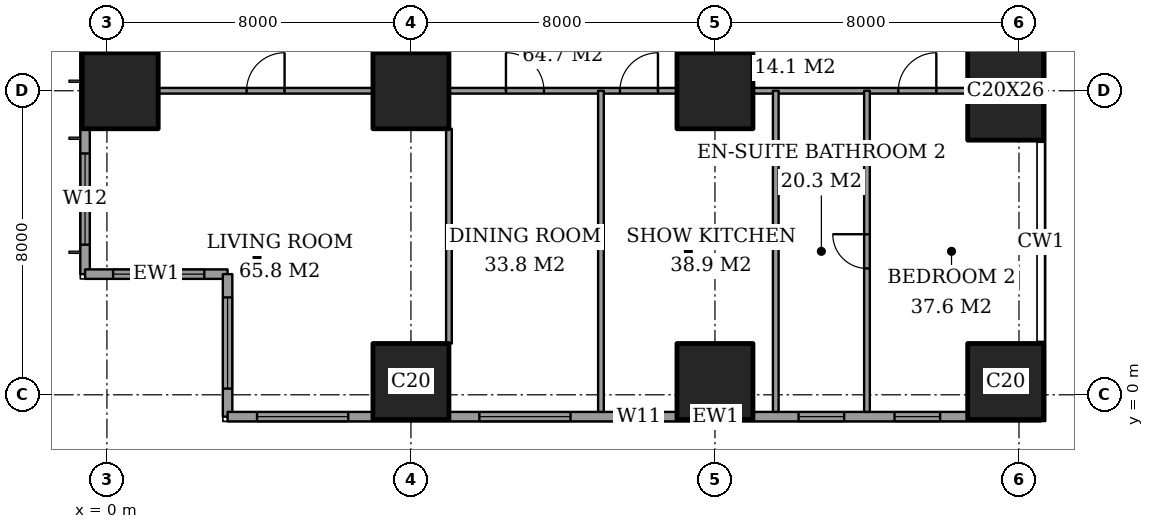
"""IFC4 building model, lengths in metres.
Left out: names, types, materials, properties, quantities, classifications, styles, units other than length and angle.
Written with IfcOpenShell. Run it as: python <this file> out.ifc"""

import sys

from ifc_helpers import new_model, si_unit, direction, frame, frame_2d, origin, origin_2d, place, context, subcontext, project, spatial, rectangle, extrude, element, fill, save


model = new_model("IFC4")
c1 = context("Model", 3, precision=1e-05, world=origin(), true_north=direction((0.0, 1.0)))
c2 = subcontext(c1, "Body", "Model", "MODEL_VIEW")
j1 = project(units=[si_unit("LENGTHUNIT", "METRE"), si_unit("PLANEANGLEUNIT", "RADIAN")], contexts=[c1])
p1 = place(None, origin())
s1 = spatial("IfcSite", under=j1, at=p1, CompositionType="ELEMENT")
p2 = place(p1, origin())
s2 = spatial("IfcBuilding", under=s1, at=p2, CompositionType="ELEMENT")
p3 = place(p2, frame((0.0, 0.0, 139.4)))
s3 = spatial("IfcBuildingStorey", under=s2, at=p3, CompositionType="ELEMENT", Elevation=139.4)
for number, where, z_axis, x_axis in (
    (1, (0.35, 8.0, 0.0), (0.0, 0.0, 1.0), (1.0, 0.0, 0.0)),
    (2, (8.0, 0.35, 0.0), (0.0, 0.0, 1.0), (1.0, 0.0, 0.0)),
    (3, (8.0, 8.0, 0.0), (0.0, 0.0, 1.0), (1.0, 0.0, 0.0)),
    (4, (16.0, 0.35, 0.0), (0.0, 0.0, 1.0), (1.0, 0.0, 0.0)),
    (5, (16.0, 8.0, 0.0), (0.0, 0.0, 1.0), (1.0, 0.0, 0.0)),
    (6, (23.65, 0.35, 0.0), (0.0, 0.0, 1.0), (1.0, 0.0, 0.0)),
):
    element("IfcColumn", number, at=place(p3, frame(where, z_axis=z_axis, x_axis=x_axis)), inside=s3, PredefinedType="COLUMN", context=c2, shape_type="SweptSolid", body=[
        extrude(rectangle(XDim=2.0, YDim=2.0, at=origin_2d()), origin(), (0.0, 0.0, 1.0), 3.6),
    ])
p4 = place(p3, frame((23.65, 8.0, 0.0), z_axis=(0.0, 0.0, 1.0), x_axis=(1.0, 0.0, 0.0)))
e7 = element("IfcColumn", 7, at=p4, inside=s3, PredefinedType="COLUMN", context=c2, shape_type="SweptSolid", body=[
    extrude(rectangle(XDim=2.0, YDim=2.6, at=origin_2d()), origin(), (0.0, 0.0, 1.0), 3.6),
])
p5 = place(p3, frame((-0.575, 44.825, 0.0), z_axis=(0.0, 0.0, 1.0), x_axis=(0.0, -1.0, 0.0)))
e8 = element("IfcWall", 8, at=p5, inside=s3, PredefinedType="SOLIDWALL", context=c2, shape_type="SweptSolid", body=[
    extrude(rectangle(XDim=41.65, YDim=0.25, at=frame_2d((20.825, 0.0))), origin(), (0.0, 0.0, 1.0), 3.6),
])
p6 = place(p5, frame((0.775, 0.0, 0.4)))
e9 = element("IfcOpeningElement", 9, at=p6, cuts=e8, PredefinedType="OPENING", context=c2, shape_type="SweptSolid", body=[
    extrude(rectangle(XDim=2.4, YDim=2.2, at=frame_2d((1.2, 1.1))), frame((0.0, 0.135, 0.0), z_axis=(0.0, -1.0, 0.0), x_axis=(1.0, 0.0, 0.0)), (0.0, 0.0, 1.0), 0.27),
])
p7 = place(p5, frame((6.1, 0.0, 0.4)))
e10 = element("IfcOpeningElement", 10, at=p7, cuts=e8, PredefinedType="OPENING", context=c2, shape_type="SweptSolid", body=[
    extrude(rectangle(XDim=1.2, YDim=2.2, at=frame_2d((0.6, 1.1))), frame((0.0, 0.135, 0.0), z_axis=(0.0, -1.0, 0.0), x_axis=(1.0, 0.0, 0.0)), (0.0, 0.0, 1.0), 0.27),
])
p8 = place(p5, frame((8.425, 0.0, 0.4)))
e11 = element("IfcOpeningElement", 11, at=p8, cuts=e8, PredefinedType="OPENING", context=c2, shape_type="SweptSolid", body=[
    extrude(rectangle(XDim=2.4, YDim=2.2, at=frame_2d((1.2, 1.1))), frame((0.0, 0.135, 0.0), z_axis=(0.0, -1.0, 0.0), x_axis=(1.0, 0.0, 0.0)), (0.0, 0.0, 1.0), 0.27),
])
p9 = place(p5, frame((15.625, 0.0, 0.4)))
e12 = element("IfcOpeningElement", 12, at=p9, cuts=e8, PredefinedType="OPENING", context=c2, shape_type="SweptSolid", body=[
    extrude(rectangle(XDim=2.4, YDim=2.2, at=frame_2d((1.2, 1.1))), frame((0.0, 0.135, 0.0), z_axis=(0.0, -1.0, 0.0), x_axis=(1.0, 0.0, 0.0)), (0.0, 0.0, 1.0), 0.27),
])
p10 = place(p5, frame((23.625, 0.0, 0.4)))
e13 = element("IfcOpeningElement", 13, at=p10, cuts=e8, PredefinedType="OPENING", context=c2, shape_type="SweptSolid", body=[
    extrude(rectangle(XDim=2.4, YDim=2.2, at=frame_2d((1.2, 1.1))), frame((0.0, 0.135, 0.0), z_axis=(0.0, -1.0, 0.0), x_axis=(1.0, 0.0, 0.0)), (0.0, 0.0, 1.0), 0.27),
])
p11 = place(p5, frame((30.825, 0.0, 0.4)))
e14 = element("IfcOpeningElement", 14, at=p11, cuts=e8, PredefinedType="OPENING", context=c2, shape_type="SweptSolid", body=[
    extrude(rectangle(XDim=2.4, YDim=2.2, at=frame_2d((1.2, 1.1))), frame((0.0, 0.135, 0.0), z_axis=(0.0, -1.0, 0.0), x_axis=(1.0, 0.0, 0.0)), (0.0, 0.0, 1.0), 0.27),
])
p12 = place(p5, frame((34.5, 0.0, 0.4)))
e15 = element("IfcOpeningElement", 15, at=p12, cuts=e8, PredefinedType="OPENING", context=c2, shape_type="SweptSolid", body=[
    extrude(rectangle(XDim=1.2, YDim=2.2, at=frame_2d((0.6, 1.1))), frame((0.0, 0.135, 0.0), z_axis=(0.0, -1.0, 0.0), x_axis=(1.0, 0.0, 0.0)), (0.0, 0.0, 1.0), 0.27),
])
p13 = place(p5, frame((38.475, 0.0, 0.4)))
e16 = element("IfcOpeningElement", 16, at=p13, cuts=e8, PredefinedType="OPENING", context=c2, shape_type="SweptSolid", body=[
    extrude(rectangle(XDim=2.4, YDim=2.2, at=frame_2d((1.2, 1.1))), frame((0.0, 0.135, 0.0), z_axis=(0.0, -1.0, 0.0), x_axis=(1.0, 0.0, 0.0)), (0.0, 0.0, 1.0), 0.27),
])
p14 = place(p3, frame((-0.575, 3.175, 0.0), z_axis=(0.0, 0.0, 1.0), x_axis=(1.0, 0.0, 0.0)))
e17 = element("IfcWall", 17, at=p14, inside=s3, PredefinedType="SOLIDWALL", context=c2, shape_type="SweptSolid", body=[
    extrude(rectangle(XDim=3.75, YDim=0.25, at=frame_2d((1.875, 0.0))), origin(), (0.0, 0.0, 1.0), 3.6),
])
p15 = place(p14, frame((0.738, 0.0, 0.4)))
e18 = element("IfcOpeningElement", 18, at=p15, cuts=e17, PredefinedType="OPENING", context=c2, shape_type="SweptSolid", body=[
    extrude(rectangle(XDim=2.4, YDim=2.2, at=frame_2d((1.2, 1.1))), frame((0.0, 0.135, 0.0), z_axis=(0.0, -1.0, 0.0), x_axis=(1.0, 0.0, 0.0)), (0.0, 0.0, 1.0), 0.27),
])
p16 = place(p3, frame((3.175, 3.175, 0.0), z_axis=(0.0, 0.0, 1.0), x_axis=(0.0, -1.0, 0.0)))
e19 = element("IfcWall", 19, at=p16, inside=s3, PredefinedType="SOLIDWALL", context=c2, shape_type="SweptSolid", body=[
    extrude(rectangle(XDim=3.75, YDim=0.25, at=frame_2d((1.875, 0.0))), origin(), (0.0, 0.0, 1.0), 3.6),
])
p17 = place(p16, frame((0.613, 0.0, 0.4)))
e20 = element("IfcOpeningElement", 20, at=p17, cuts=e19, PredefinedType="OPENING", context=c2, shape_type="SweptSolid", body=[
    extrude(rectangle(XDim=2.4, YDim=2.2, at=frame_2d((1.2, 1.1))), frame((0.0, 0.135, 0.0), z_axis=(0.0, -1.0, 0.0), x_axis=(1.0, 0.0, 0.0)), (0.0, 0.0, 1.0), 0.27),
])
p18 = place(p3, frame((3.175, -0.575, 0.0), z_axis=(0.0, 0.0, 1.0), x_axis=(1.0, 0.0, 0.0)))
e21 = element("IfcWall", 21, at=p18, inside=s3, PredefinedType="SOLIDWALL", context=c2, shape_type="SweptSolid", body=[
    extrude(rectangle(XDim=21.4, YDim=0.25, at=frame_2d((10.7, 0.0))), origin(), (0.0, 0.0, 1.0), 3.6),
])
p19 = place(p18, frame((0.775, 0.0, 0.4)))
e22 = element("IfcOpeningElement", 22, at=p19, cuts=e21, PredefinedType="OPENING", context=c2, shape_type="SweptSolid", body=[
    extrude(rectangle(XDim=2.4, YDim=2.2, at=frame_2d((1.2, 1.1))), frame((0.0, 0.135, 0.0), z_axis=(0.0, -1.0, 0.0), x_axis=(1.0, 0.0, 0.0)), (0.0, 0.0, 1.0), 0.27),
])
p20 = place(p18, frame((6.625, 0.0, 0.4)))
e23 = element("IfcOpeningElement", 23, at=p20, cuts=e21, PredefinedType="OPENING", context=c2, shape_type="SweptSolid", body=[
    extrude(rectangle(XDim=2.4, YDim=2.2, at=frame_2d((1.2, 1.1))), frame((0.0, 0.135, 0.0), z_axis=(0.0, -1.0, 0.0), x_axis=(1.0, 0.0, 0.0)), (0.0, 0.0, 1.0), 0.27),
])
p21 = place(p18, frame((10.225, 0.0, 0.4)))
e24 = element("IfcOpeningElement", 24, at=p21, cuts=e21, PredefinedType="OPENING", context=c2, shape_type="SweptSolid", body=[
    extrude(rectangle(XDim=1.2, YDim=2.2, at=frame_2d((0.6, 1.1))), frame((0.0, 0.135, 0.0), z_axis=(0.0, -1.0, 0.0), x_axis=(1.0, 0.0, 0.0)), (0.0, 0.0, 1.0), 0.27),
])
p22 = place(p18, frame((15.025, 0.0, 0.4)))
e25 = element("IfcOpeningElement", 25, at=p22, cuts=e21, PredefinedType="OPENING", context=c2, shape_type="SweptSolid", body=[
    extrude(rectangle(XDim=1.2, YDim=2.2, at=frame_2d((0.6, 1.1))), frame((0.0, 0.135, 0.0), z_axis=(0.0, -1.0, 0.0), x_axis=(1.0, 0.0, 0.0)), (0.0, 0.0, 1.0), 0.27),
])
p23 = place(p18, frame((17.55, 0.0, 0.4)))
e26 = element("IfcOpeningElement", 26, at=p23, cuts=e21, PredefinedType="OPENING", context=c2, shape_type="SweptSolid", body=[
    extrude(rectangle(XDim=1.2, YDim=2.2, at=frame_2d((0.6, 1.1))), frame((0.0, 0.135, 0.0), z_axis=(0.0, -1.0, 0.0), x_axis=(1.0, 0.0, 0.0)), (0.0, 0.0, 1.0), 0.27),
])
p24 = place(p3, frame((1.35, 8.0, 0.0), z_axis=(0.0, 0.0, 1.0), x_axis=(1.0, 0.0, 0.0)))
e27 = element("IfcWall", 27, at=p24, inside=s3, PredefinedType="PARTITIONING", context=c2, shape_type="SweptSolid", body=[
    extrude(rectangle(XDim=5.65, YDim=0.15, at=frame_2d((2.825, 0.0))), origin(), (0.0, 0.0, 1.0), 3.35),
])
p25 = place(p24, frame((2.325, 0.0, 0.0)))
e28 = element("IfcOpeningElement", 28, at=p25, cuts=e27, PredefinedType="OPENING", context=c2, shape_type="SweptSolid", body=[
    extrude(rectangle(XDim=1.0, YDim=2.1, at=frame_2d((0.5, 1.05))), frame((0.0, 0.085, 0.0), z_axis=(0.0, -1.0, 0.0), x_axis=(1.0, 0.0, 0.0)), (0.0, 0.0, 1.0), 0.17),
])
p26 = place(p3, frame((9.0, 8.0, 0.0), z_axis=(0.0, 0.0, 1.0), x_axis=(1.0, 0.0, 0.0)))
e29 = element("IfcWall", 29, at=p26, inside=s3, PredefinedType="PARTITIONING", context=c2, shape_type="SweptSolid", body=[
    extrude(rectangle(XDim=6.0, YDim=0.15, at=frame_2d((3.0, 0.0))), origin(), (0.0, 0.0, 1.0), 3.35),
])
p27 = place(p26, frame((1.5, 0.0, 0.0)))
e30 = element("IfcOpeningElement", 30, at=p27, cuts=e29, PredefinedType="OPENING", context=c2, shape_type="SweptSolid", body=[
    extrude(rectangle(XDim=1.0, YDim=2.1, at=frame_2d((0.5, 1.05))), frame((0.0, 0.085, 0.0), z_axis=(0.0, -1.0, 0.0), x_axis=(1.0, 0.0, 0.0)), (0.0, 0.0, 1.0), 0.17),
])
p28 = place(p26, frame((4.5, 0.0, 0.0)))
e31 = element("IfcOpeningElement", 31, at=p28, cuts=e29, PredefinedType="OPENING", context=c2, shape_type="SweptSolid", body=[
    extrude(rectangle(XDim=1.0, YDim=2.1, at=frame_2d((0.5, 1.05))), frame((0.0, 0.085, 0.0), z_axis=(0.0, -1.0, 0.0), x_axis=(1.0, 0.0, 0.0)), (0.0, 0.0, 1.0), 0.17),
])
p29 = place(p3, frame((17.0, 8.0, 0.0), z_axis=(0.0, 0.0, 1.0), x_axis=(1.0, 0.0, 0.0)))
e32 = element("IfcWall", 32, at=p29, inside=s3, PredefinedType="PARTITIONING", context=c2, shape_type="SweptSolid", body=[
    extrude(rectangle(XDim=5.65, YDim=0.15, at=frame_2d((2.825, 0.0))), origin(), (0.0, 0.0, 1.0), 3.35),
])
p30 = place(p29, frame((3.825, 0.0, 0.0)))
e33 = element("IfcOpeningElement", 33, at=p30, cuts=e32, PredefinedType="OPENING", context=c2, shape_type="SweptSolid", body=[
    extrude(rectangle(XDim=1.0, YDim=2.1, at=frame_2d((0.5, 1.05))), frame((0.0, 0.085, 0.0), z_axis=(0.0, -1.0, 0.0), x_axis=(1.0, 0.0, 0.0)), (0.0, 0.0, 1.0), 0.17),
])
p31 = place(p3, frame((9.0, 1.35, 0.0), z_axis=(0.0, 0.0, 1.0), x_axis=(0.0, 1.0, 0.0)))
e34 = element("IfcWall", 34, at=p31, inside=s3, PredefinedType="PARTITIONING", context=c2, shape_type="SweptSolid", body=[
    extrude(rectangle(XDim=5.65, YDim=0.15, at=frame_2d((2.825, 0.0))), origin(), (0.0, 0.0, 1.0), 3.35),
])
for number, where, z_axis, x_axis in (
    (35, (13.0, -0.45, 0.0), (0.0, 0.0, 1.0), (0.0, 1.0, 0.0)),
    (36, (17.6, -0.45, 0.0), (0.0, 0.0, 1.0), (0.0, 1.0, 0.0)),
):
    element("IfcWall", number, at=place(p3, frame(where, z_axis=z_axis, x_axis=x_axis)), inside=s3, PredefinedType="PARTITIONING", context=c2, shape_type="SweptSolid", body=[
        extrude(rectangle(XDim=8.45, YDim=0.15, at=frame_2d((4.225, 0.0))), origin(), (0.0, 0.0, 1.0), 3.35),
    ])
p32 = place(p3, frame((20.0, -0.45, 0.0), z_axis=(0.0, 0.0, 1.0), x_axis=(0.0, 1.0, 0.0)))
e37 = element("IfcWall", 37, at=p32, inside=s3, PredefinedType="PARTITIONING", context=c2, shape_type="SweptSolid", body=[
    extrude(rectangle(XDim=8.45, YDim=0.15, at=frame_2d((4.225, 0.0))), origin(), (0.0, 0.0, 1.0), 3.35),
])
p33 = place(p32, frame((3.775, 0.0, 0.0)))
e38 = element("IfcOpeningElement", 38, at=p33, cuts=e37, PredefinedType="OPENING", context=c2, shape_type="SweptSolid", body=[
    extrude(rectangle(XDim=0.9, YDim=2.1, at=frame_2d((0.45, 1.05))), frame((0.0, 0.085, 0.0), z_axis=(0.0, -1.0, 0.0), x_axis=(1.0, 0.0, 0.0)), (0.0, 0.0, 1.0), 0.17),
])
p34 = place(p13, origin())
e39 = element("IfcWindow", 39, at=p34, inside=s3, PartitioningType="SINGLE_PANEL", PredefinedType="WINDOW", context=c2, shape_type="SweptSolid", body=[
    extrude(rectangle(XDim=2.4, YDim=2.2, at=frame_2d((1.2, 1.1))), frame((0.0, 0.03, 0.0), z_axis=(0.0, -1.0, 0.0), x_axis=(1.0, 0.0, 0.0)), (0.0, 0.0, 1.0), 0.06),
])
fill(e16, e39)
p35 = place(p15, origin())
e40 = element("IfcWindow", 40, at=p35, inside=s3, PartitioningType="SINGLE_PANEL", PredefinedType="WINDOW", context=c2, shape_type="SweptSolid", body=[
    extrude(rectangle(XDim=2.4, YDim=2.2, at=frame_2d((1.2, 1.1))), frame((0.0, 0.03, 0.0), z_axis=(0.0, -1.0, 0.0), x_axis=(1.0, 0.0, 0.0)), (0.0, 0.0, 1.0), 0.06),
])
fill(e18, e40)
p36 = place(p17, origin())
e41 = element("IfcWindow", 41, at=p36, inside=s3, PartitioningType="SINGLE_PANEL", PredefinedType="WINDOW", context=c2, shape_type="SweptSolid", body=[
    extrude(rectangle(XDim=2.4, YDim=2.2, at=frame_2d((1.2, 1.1))), frame((0.0, 0.03, 0.0), z_axis=(0.0, -1.0, 0.0), x_axis=(1.0, 0.0, 0.0)), (0.0, 0.0, 1.0), 0.06),
])
fill(e20, e41)
p37 = place(p19, origin())
e42 = element("IfcWindow", 42, at=p37, inside=s3, PartitioningType="SINGLE_PANEL", PredefinedType="WINDOW", context=c2, shape_type="SweptSolid", body=[
    extrude(rectangle(XDim=2.4, YDim=2.2, at=frame_2d((1.2, 1.1))), frame((0.0, 0.03, 0.0), z_axis=(0.0, -1.0, 0.0), x_axis=(1.0, 0.0, 0.0)), (0.0, 0.0, 1.0), 0.06),
])
fill(e22, e42)
p38 = place(p20, origin())
e43 = element("IfcWindow", 43, at=p38, inside=s3, PartitioningType="SINGLE_PANEL", PredefinedType="WINDOW", context=c2, shape_type="SweptSolid", body=[
    extrude(rectangle(XDim=2.4, YDim=2.2, at=frame_2d((1.2, 1.1))), frame((0.0, 0.03, 0.0), z_axis=(0.0, -1.0, 0.0), x_axis=(1.0, 0.0, 0.0)), (0.0, 0.0, 1.0), 0.06),
])
fill(e23, e43)
p39 = place(p21, origin())
e44 = element("IfcWindow", 44, at=p39, inside=s3, PartitioningType="SINGLE_PANEL", PredefinedType="WINDOW", context=c2, shape_type="SweptSolid", body=[
    extrude(rectangle(XDim=1.2, YDim=2.2, at=frame_2d((0.6, 1.1))), frame((0.0, 0.03, 0.0), z_axis=(0.0, -1.0, 0.0), x_axis=(1.0, 0.0, 0.0)), (0.0, 0.0, 1.0), 0.06),
])
fill(e24, e44)
p40 = place(p22, origin())
e45 = element("IfcWindow", 45, at=p40, inside=s3, PartitioningType="SINGLE_PANEL", PredefinedType="WINDOW", context=c2, shape_type="SweptSolid", body=[
    extrude(rectangle(XDim=1.2, YDim=2.2, at=frame_2d((0.6, 1.1))), frame((0.0, 0.03, 0.0), z_axis=(0.0, -1.0, 0.0), x_axis=(1.0, 0.0, 0.0)), (0.0, 0.0, 1.0), 0.06),
])
fill(e25, e45)
p41 = place(p23, origin())
e46 = element("IfcWindow", 46, at=p41, inside=s3, PartitioningType="SINGLE_PANEL", PredefinedType="WINDOW", context=c2, shape_type="SweptSolid", body=[
    extrude(rectangle(XDim=1.2, YDim=2.2, at=frame_2d((0.6, 1.1))), frame((0.0, 0.03, 0.0), z_axis=(0.0, -1.0, 0.0), x_axis=(1.0, 0.0, 0.0)), (0.0, 0.0, 1.0), 0.06),
])
fill(e26, e46)
p42 = place(p25, origin())
e47 = element("IfcDoor", 47, at=p42, inside=s3, OperationType="SINGLE_SWING_LEFT", PredefinedType="DOOR", context=c2, shape_type="SweptSolid", body=[
    extrude(rectangle(XDim=1.0, YDim=2.1, at=frame_2d((0.5, 1.05))), frame((0.0, 0.025, 0.0), z_axis=(0.0, -1.0, 0.0), x_axis=(1.0, 0.0, 0.0)), (0.0, 0.0, 1.0), 0.05),
])
fill(e28, e47)
p43 = place(p27, origin())
e48 = element("IfcDoor", 48, at=p43, inside=s3, OperationType="SINGLE_SWING_RIGHT", PredefinedType="DOOR", context=c2, shape_type="SweptSolid", body=[
    extrude(rectangle(XDim=1.0, YDim=2.1, at=frame_2d((0.5, 1.05))), frame((0.0, 0.025, 0.0), z_axis=(0.0, -1.0, 0.0), x_axis=(1.0, 0.0, 0.0)), (0.0, 0.0, 1.0), 0.05),
])
fill(e30, e48)
p44 = place(p28, origin())
e49 = element("IfcDoor", 49, at=p44, inside=s3, OperationType="SINGLE_SWING_LEFT", PredefinedType="DOOR", context=c2, shape_type="SweptSolid", body=[
    extrude(rectangle(XDim=1.0, YDim=2.1, at=frame_2d((0.5, 1.05))), frame((0.0, 0.025, 0.0), z_axis=(0.0, -1.0, 0.0), x_axis=(1.0, 0.0, 0.0)), (0.0, 0.0, 1.0), 0.05),
])
fill(e31, e49)
p45 = place(p33, origin())
e50 = element("IfcDoor", 50, at=p45, inside=s3, OperationType="SINGLE_SWING_LEFT", PredefinedType="DOOR", context=c2, shape_type="SweptSolid", body=[
    extrude(rectangle(XDim=0.9, YDim=2.1, at=frame_2d((0.45, 1.05))), frame((0.0, 0.025, 0.0), z_axis=(0.0, -1.0, 0.0), x_axis=(1.0, 0.0, 0.0)), (0.0, 0.0, 1.0), 0.05),
])
fill(e38, e50)
p46 = place(p30, origin())
e51 = element("IfcDoor", 51, at=p46, inside=s3, OperationType="SINGLE_SWING_LEFT", PredefinedType="DOOR", context=c2, shape_type="SweptSolid", body=[
    extrude(rectangle(XDim=1.0, YDim=2.1, at=frame_2d((0.5, 1.05))), frame((0.0, 0.025, 0.0), z_axis=(0.0, -1.0, 0.0), x_axis=(1.0, 0.0, 0.0)), (0.0, 0.0, 1.0), 0.05),
])
fill(e33, e51)
save(model, sys.argv[1])
